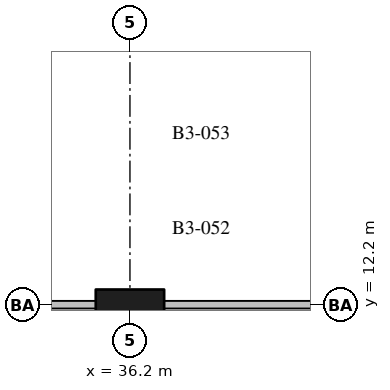
"""IFC4 building model, lengths in metres.
Left out: names, types, materials, properties, quantities, classifications, styles, units other than length and angle.
Written with IfcOpenShell. Run it as: python <this file> out.ifc"""

import sys

from ifc_helpers import new_model, si_unit, direction, frame, frame_2d, origin, origin_2d, place, context, subcontext, project, spatial, rectangle, extrude, element, save


model = new_model("IFC4")
c1 = context("Model", 3, precision=1e-05, world=origin(), true_north=direction((0.0, 1.0)))
c2 = subcontext(c1, "Body", "Model", "MODEL_VIEW")
j1 = project(units=[si_unit("LENGTHUNIT", "METRE"), si_unit("PLANEANGLEUNIT", "RADIAN")], contexts=[c1])
p1 = place(None, origin())
s1 = spatial("IfcSite", under=j1, at=p1, CompositionType="ELEMENT")
p2 = place(p1, origin())
s2 = spatial("IfcBuilding", under=s1, at=p2, CompositionType="ELEMENT")
p3 = place(p2, frame((0.0, 0.0, -17.0)))
s3 = spatial("IfcBuildingStorey", under=s2, at=p3, CompositionType="ELEMENT", Elevation=-17.0)
p4 = place(p3, frame((36.2, 12.2, -0.5), z_axis=(0.0, 0.0, 1.0), x_axis=(1.0, 0.0, 0.0)))
e1 = element("IfcColumn", 1, at=p4, inside=s3, PredefinedType="COLUMN", context=c2, shape_type="SweptSolid", body=[
    extrude(rectangle(XDim=1.8, YDim=0.8, at=origin_2d()), origin(), (0.0, 0.0, 1.0), 5.5),
])
p5 = place(p3, frame((25.7, 12.2, 0.0), z_axis=(0.0, 0.0, 1.0), x_axis=(1.0, 0.0, 0.0)))
e2 = element("IfcWall", 2, at=p5, inside=s3, PredefinedType="PARTITIONING", context=c2, shape_type="SweptSolid", body=[
    extrude(rectangle(XDim=20.55, YDim=0.2, at=frame_2d((10.275, 0.0))), origin(), (0.0, 0.0, 1.0), 4.6),
])
p6 = place(p5, frame((4.312, 0.0, 0.0)))
e3 = element("IfcOpeningElement", 3, at=p6, cuts=e2, PredefinedType="OPENING", context=c2, shape_type="SweptSolid", body=[
    extrude(rectangle(XDim=1.8, YDim=2.1, at=frame_2d((0.9, 1.05))), frame((0.0, 0.11, 0.0), z_axis=(0.0, -1.0, 0.0), x_axis=(1.0, 0.0, 0.0)), (0.0, 0.0, 1.0), 0.22),
])
p7 = place(p5, frame((15.56, 0.0, 0.0)))
e4 = element("IfcOpeningElement", 4, at=p7, cuts=e2, PredefinedType="OPENING", context=c2, shape_type="SweptSolid", body=[
    extrude(rectangle(XDim=1.8, YDim=2.1, at=frame_2d((0.9, 1.05))), frame((0.0, 0.11, 0.0), z_axis=(0.0, -1.0, 0.0), x_axis=(1.0, 0.0, 0.0)), (0.0, 0.0, 1.0), 0.22),
])
save(model, sys.argv[1])
